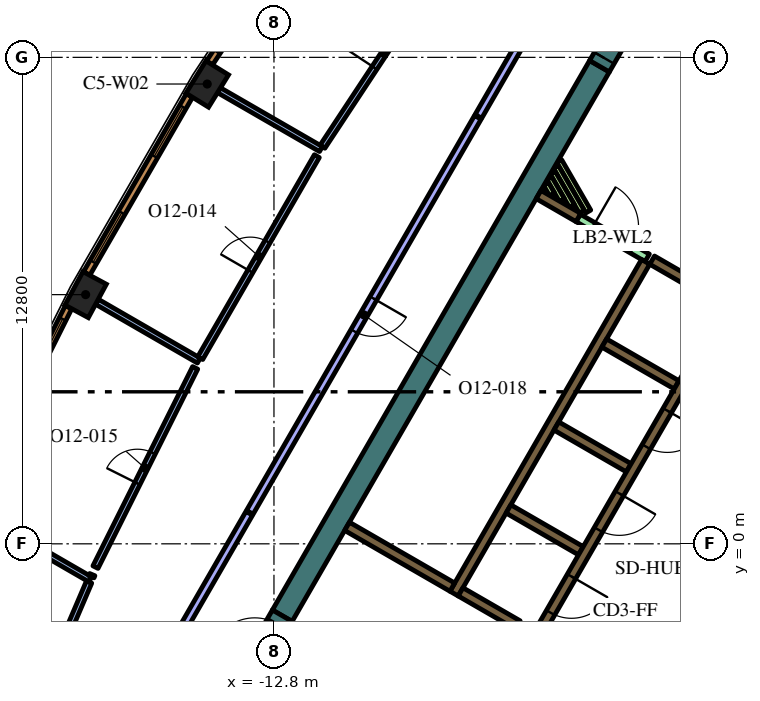
"""IFC4 building model, lengths in metres.
Left out: names, types, materials, properties, quantities, classifications, styles, units other than length and angle.
Written with IfcOpenShell. Run it as: python <this file> out.ifc"""

import sys

from ifc_helpers import new_model, si_unit, direction, frame, frame_2d, origin, origin_2d, place, context, subcontext, project, spatial, polyline, rectangle, outline, extrude, element, fill, save


model = new_model("IFC4")
c1 = context("Model", 3, precision=1e-05, world=origin(), true_north=direction((0.0, 1.0)))
c2 = subcontext(c1, "Body", "Model", "MODEL_VIEW")
j1 = project(units=[si_unit("LENGTHUNIT", "METRE"), si_unit("PLANEANGLEUNIT", "RADIAN")], contexts=[c1])
p1 = place(None, origin())
s1 = spatial("IfcSite", under=j1, at=p1, CompositionType="ELEMENT")
p2 = place(p1, origin())
s2 = spatial("IfcBuilding", under=s1, at=p2, CompositionType="ELEMENT")
p3 = place(p2, frame((0.0, 0.0, 279.6)))
s3 = spatial("IfcBuildingStorey", under=s2, at=p3, CompositionType="ELEMENT", Elevation=279.6)
for number, where, z_axis, x_axis in (
    (1, (-14.556, 12.098, 0.0), (0.0, 0.0, 1.0), (-0.526, -0.851, 0.0)),
    (2, (-17.756, 6.557, 0.0), (0.0, 0.0, 1.0), (-0.474, -0.881, 0.0)),
):
    element("IfcColumn", number, at=place(p3, frame(where, z_axis=z_axis, x_axis=x_axis)), inside=s3, PredefinedType="COLUMN", context=c2, shape_type="SweptSolid", body=[
        extrude(rectangle(XDim=1.0, YDim=0.7, at=origin_2d()), origin(), (0.0, 0.0, 1.0), 4.2),
    ])
p4 = place(p3, frame((-4.234, 12.566, 0.0), z_axis=(0.0, 0.0, 1.0), x_axis=(-0.499998841866, -0.866026072432, 0.0)))
e3 = element("IfcWall", 3, at=p4, inside=s3, PredefinedType="SOLIDWALL", context=c2, shape_type="SweptSolid", body=[
    extrude(rectangle(XDim=16.694, YDim=0.6, at=frame_2d((8.347, 0.0))), origin(), (0.0, 0.0, 1.0), 4.2),
])
p5 = place(p3, frame((-3.02, 7.419, 0.0), z_axis=(0.0, 0.0, 1.0), x_axis=(-0.500022956343, -0.866012149528, 0.0)))
e4 = element("IfcWall", 4, at=p5, inside=s3, PredefinedType="SOLIDWALL", context=c2, shape_type="SweptSolid", body=[
    extrude(rectangle(XDim=10.08, YDim=0.25, at=frame_2d((5.04, 0.0))), origin(), (0.0, 0.0, 1.0), 4.2),
])
p6 = place(p3, origin())
e5 = element("IfcWall", 5, at=p6, inside=s3, PredefinedType="SOLIDWALL", context=c2, shape_type="SweptSolid", body=[
    extrude(outline(polyline([(-2.912, 7.356), (-2.787, 7.573), (-1.232, 6.675), (-1.303, 6.675), (-1.304, 6.675), (-1.304, 6.675), (-1.304, 6.525), (-1.304, 6.525), (-1.303, 6.525), (-0.971, 6.525), (-0.665, 6.348), (-0.79, 6.132), (-1.007, 6.257), (-1.007, 6.257), (-2.912, 7.356)])), origin(), (0.0, 0.0, 1.0), 4.2),
])
for number, where, z_axis, x_axis in (
    (6, (-2.204, 4.182, 0.0), (0.0, 0.0, 1.0), (-0.866, 0.5, 0.0)),
    (7, (-5.369, 3.1, 0.0), (0.0, 0.0, 1.0), (0.866, -0.5, 0.0)),
    (8, (-4.724, -0.182, 0.0), (0.0, 0.0, 1.0), (-0.866, 0.5, 0.0)),
):
    element("IfcWall", number, at=place(p3, frame(where, z_axis=z_axis, x_axis=x_axis)), inside=s3, PredefinedType="SOLIDWALL", context=c2, shape_type="SweptSolid", body=[
        extrude(rectangle(XDim=2.2, YDim=0.25, at=frame_2d((1.1, 0.0))), origin(), (0.0, 0.0, 1.0), 4.2),
    ])
p7 = place(p3, frame((-7.889, -1.265, 0.0), z_axis=(0.0, 0.0, 1.0), x_axis=(0.865986741702, -0.500066958712, 0.0)))
e9 = element("IfcWall", 9, at=p7, inside=s3, PredefinedType="SOLIDWALL", context=c2, shape_type="SweptSolid", body=[
    extrude(rectangle(XDim=1.738, YDim=0.25, at=frame_2d((0.869, 0.0))), origin(), (0.0, 0.0, 1.0), 4.2),
])
p8 = place(p3, frame((-8.106, -1.14, 0.0), z_axis=(0.0, 0.0, 1.0), x_axis=(-0.866008981251, 0.500028443584, 0.0)))
e10 = element("IfcWall", 10, at=p8, inside=s3, PredefinedType="SOLIDWALL", context=c2, shape_type="SweptSolid", body=[
    extrude(rectangle(XDim=3.2, YDim=0.25, at=frame_2d((1.6, 0.0))), origin(), (0.0, 0.0, 1.0), 4.2),
])
p9 = place(p3, frame((-5.837, 9.19, 0.0), z_axis=(0.0, 0.0, 1.0), x_axis=(0.866024298998, -0.500001913541, 0.0)))
e11 = element("IfcWall", 11, at=p9, inside=s3, PredefinedType="SOLIDWALL", context=c2, shape_type="SweptSolid", body=[
    extrude(rectangle(XDim=1.21, YDim=0.25, at=frame_2d((0.605, 0.0))), origin(), (0.0, 0.0, 1.0), 4.2),
])
p10 = place(p3, frame((-5.294, 10.067, 0.0), z_axis=(0.0, 0.0, 1.0), x_axis=(0.500054140411, -0.865994143547, 0.0)))
e12 = element("IfcWall", 12, at=p10, inside=s3, PredefinedType="PARTITIONING", context=c2, shape_type="SweptSolid", body=[
    extrude(rectangle(XDim=1.529, YDim=0.15, at=frame_2d((0.765, 0.0))), origin(), (0.0, 0.0, 1.0), 3.55),
])
p11 = place(p3, frame((-5.381, 9.917, 0.0), z_axis=(0.0, 0.0, 1.0), x_axis=(0.500136970483, -0.865946309396, 0.0)))
e13 = element("IfcWall", 13, at=p11, inside=s3, PredefinedType="PARTITIONING", context=c2, shape_type="SweptSolid", body=[
    extrude(rectangle(XDim=1.359, YDim=0.15, at=frame_2d((0.68, 0.0))), origin(), (0.0, 0.0, 1.0), 3.55),
])
p12 = place(p3, frame((-5.467, 9.767, 0.0), z_axis=(0.0, 0.0, 1.0), x_axis=(0.500168849293, -0.86592789665, 0.0)))
e14 = element("IfcWall", 14, at=p12, inside=s3, PredefinedType="PARTITIONING", context=c2, shape_type="SweptSolid", body=[
    extrude(rectangle(XDim=1.01, YDim=0.15, at=frame_2d((0.505, 0.0))), origin(), (0.0, 0.0, 1.0), 3.55),
])
p13 = place(p3, frame((-5.554, 9.617, 0.0), z_axis=(0.0, 0.0, 1.0), x_axis=(0.500253084543, -0.86587923604, 0.0)))
e15 = element("IfcWall", 15, at=p13, inside=s3, PredefinedType="PARTITIONING", context=c2, shape_type="SweptSolid", body=[
    extrude(rectangle(XDim=0.664, YDim=0.15, at=frame_2d((0.332, 0.0))), origin(), (0.0, 0.0, 1.0), 3.55),
])
p14 = place(p3, frame((-5.64, 9.467, 0.0), z_axis=(0.0, 0.0, 1.0), x_axis=(0.499944387978, -0.86605750902, 0.0)))
e16 = element("IfcWall", 16, at=p14, inside=s3, PredefinedType="PARTITIONING", context=c2, shape_type="SweptSolid", body=[
    extrude(rectangle(XDim=0.317, YDim=0.15, at=frame_2d((0.159, 0.0))), origin(), (0.0, 0.0, 1.0), 3.55),
])
p15 = place(p3, frame((-0.898, 6.194, 0.0), z_axis=(0.0, 0.0, 1.0), x_axis=(-0.499996202215, -0.866027596426, 0.0)))
e17 = element("IfcWall", 17, at=p15, inside=s3, PredefinedType="SOLIDWALL", context=c2, shape_type="SweptSolid", body=[
    extrude(rectangle(XDim=9.83, YDim=0.25, at=frame_2d((4.915, 0.0))), origin(), (0.0, 0.0, 1.0), 4.2),
])
p16 = place(p15, frame((0.585, 0.0, 0.0)))
e18 = element("IfcOpeningElement", 18, at=p16, cuts=e17, PredefinedType="OPENING", context=c2, shape_type="SweptSolid", body=[
    extrude(rectangle(XDim=1.1, YDim=2.1, at=frame_2d((0.55, 1.05))), frame((0.0, 0.135, 0.0), z_axis=(0.0, -1.0, 0.0), x_axis=(1.0, 0.0, 0.0)), (0.0, 0.0, 1.0), 0.27),
])
p17 = place(p15, frame((3.105, 0.0, 0.0)))
e19 = element("IfcOpeningElement", 19, at=p17, cuts=e17, PredefinedType="OPENING", context=c2, shape_type="SweptSolid", body=[
    extrude(rectangle(XDim=1.1, YDim=2.1, at=frame_2d((0.55, 1.05))), frame((0.0, 0.135, 0.0), z_axis=(0.0, -1.0, 0.0), x_axis=(1.0, 0.0, 0.0)), (0.0, 0.0, 1.0), 0.27),
])
p18 = place(p15, frame((5.625, 0.0, 0.0)))
e20 = element("IfcOpeningElement", 20, at=p18, cuts=e17, PredefinedType="OPENING", context=c2, shape_type="SweptSolid", body=[
    extrude(rectangle(XDim=1.1, YDim=2.1, at=frame_2d((0.55, 1.05))), frame((0.0, 0.135, 0.0), z_axis=(0.0, -1.0, 0.0), x_axis=(1.0, 0.0, 0.0)), (0.0, 0.0, 1.0), 0.27),
])
p19 = place(p15, frame((8.145, 0.0, 0.0)))
e21 = element("IfcOpeningElement", 21, at=p19, cuts=e17, PredefinedType="OPENING", context=c2, shape_type="SweptSolid", body=[
    extrude(rectangle(XDim=1.1, YDim=2.1, at=frame_2d((0.55, 1.05))), frame((0.0, 0.135, 0.0), z_axis=(0.0, -1.0, 0.0), x_axis=(1.0, 0.0, 0.0)), (0.0, 0.0, 1.0), 0.27),
])
p20 = place(p3, frame((-4.796, 8.575, 0.0), z_axis=(0.0, 0.0, 1.0), x_axis=(0.866009402589, -0.500027713859, 0.0)))
e22 = element("IfcWall", 22, at=p20, inside=s3, PredefinedType="PARTITIONING", context=c2, shape_type="SweptSolid", body=[
    extrude(rectangle(XDim=2.1, YDim=0.226, at=frame_2d((1.05, 0.0))), origin(), (0.0, 0.0, 1.0), 3.55),
])
p21 = place(p20, frame((0.45, 0.0, 0.0)))
e23 = element("IfcOpeningElement", 23, at=p21, cuts=e22, PredefinedType="OPENING", context=c2, shape_type="SweptSolid", body=[
    extrude(rectangle(XDim=1.2, YDim=2.1, at=frame_2d((0.6, 1.05))), frame((0.0, 0.123, 0.0), z_axis=(0.0, -1.0, 0.0), x_axis=(1.0, 0.0, 0.0)), (0.0, 0.0, 1.0), 0.246),
])
p22 = place(p3, frame((-4.234, 12.566, 0.0), z_axis=(0.0, 0.0, 1.0), x_axis=(0.500000056704, 0.866025371046, 0.0)))
e24 = element("IfcWall", 24, at=p22, inside=s3, PredefinedType="SOLIDWALL", context=c2, shape_type="SweptSolid", body=[
    extrude(rectangle(XDim=1.7, YDim=0.6, at=frame_2d((0.85, 0.0))), origin(), (0.0, 0.0, 1.0), 4.2),
])
p23 = place(p22, frame((0.25, 0.0, 0.0)))
e25 = element("IfcOpeningElement", 25, at=p23, cuts=e24, PredefinedType="OPENING", context=c2, shape_type="SweptSolid", body=[
    extrude(rectangle(XDim=1.2, YDim=2.1, at=frame_2d((0.6, 1.05))), frame((0.0, 0.31, 0.0), z_axis=(0.0, -1.0, 0.0), x_axis=(1.0, 0.0, 0.0)), (0.0, 0.0, 1.0), 0.62),
])
p24 = place(p3, frame((-13.432, -3.364, 0.0), z_axis=(0.0, 0.0, 1.0), x_axis=(0.500000056704, 0.866025371046, 0.0)))
e26 = element("IfcWall", 26, at=p24, inside=s3, PredefinedType="SOLIDWALL", context=c2, shape_type="SweptSolid", body=[
    extrude(rectangle(XDim=1.7, YDim=0.6, at=frame_2d((0.85, 0.0))), origin(), (0.0, 0.0, 1.0), 4.2),
])
p25 = place(p24, frame((0.25, 0.0, 0.0)))
e27 = element("IfcOpeningElement", 27, at=p25, cuts=e26, PredefinedType="OPENING", context=c2, shape_type="SweptSolid", body=[
    extrude(rectangle(XDim=1.2, YDim=2.1, at=frame_2d((0.6, 1.05))), frame((0.0, 0.31, 0.0), z_axis=(0.0, -1.0, 0.0), x_axis=(1.0, 0.0, 0.0)), (0.0, 0.0, 1.0), 0.62),
])
p26 = place(p3, frame((-11.564, 10.387, 0.0), z_axis=(0.0, 0.0, 1.0), x_axis=(-0.86604641216, 0.499963610661, 0.0)))
e28 = element("IfcWall", 28, at=p26, inside=s3, PredefinedType="PARTITIONING", context=c2, shape_type="SweptSolid", body=[
    extrude(rectangle(XDim=3.096, YDim=0.15, at=frame_2d((1.548, 0.0))), origin(), (0.0, 0.0, 1.0), 3.55),
])
p27 = place(p3, frame((-11.523, 10.449, 0.0), z_axis=(0.0, 0.0, 1.0), x_axis=(0.550751709023, 0.834669129061, 0.0)))
e29 = element("IfcWall", 29, at=p27, inside=s3, PredefinedType="PARTITIONING", context=c2, shape_type="SweptSolid", body=[
    extrude(rectangle(XDim=5.788, YDim=0.15, at=frame_2d((2.894, 0.0))), origin(), (0.0, 0.0, 1.0), 3.55),
])
p28 = place(p27, frame((2.488, 0.0, 0.0)))
e30 = element("IfcOpeningElement", 30, at=p28, cuts=e29, PredefinedType="OPENING", context=c2, shape_type="SweptSolid", body=[
    extrude(rectangle(XDim=0.9, YDim=2.1, at=frame_2d((0.45, 1.05))), frame((0.0, 0.085, 0.0), z_axis=(0.0, -1.0, 0.0), x_axis=(1.0, 0.0, 0.0)), (0.0, 0.0, 1.0), 0.17),
])
p29 = place(p3, frame((-14.777, 4.822, 0.0), z_axis=(0.0, 0.0, 1.0), x_axis=(-0.865992557167, 0.500056887695, 0.0)))
e31 = element("IfcWall", 31, at=p29, inside=s3, PredefinedType="PARTITIONING", context=c2, shape_type="SweptSolid", body=[
    extrude(rectangle(XDim=3.096, YDim=0.15, at=frame_2d((1.548, 0.0))), origin(), (0.0, 0.0, 1.0), 3.55),
])
p30 = place(p3, frame((-14.74, 4.887, 0.0), z_axis=(0.0, 0.0, 1.0), x_axis=(0.500007141444, 0.86602128063, 0.0)))
e32 = element("IfcWall", 32, at=p30, inside=s3, PredefinedType="PARTITIONING", context=c2, shape_type="SweptSolid", body=[
    extrude(rectangle(XDim=6.137, YDim=0.15, at=frame_2d((3.068, 0.0))), origin(), (0.0, 0.0, 1.0), 3.55),
])
p31 = place(p30, frame((2.637, 0.0, 0.0)))
e33 = element("IfcOpeningElement", 33, at=p31, cuts=e32, PredefinedType="OPENING", context=c2, shape_type="SweptSolid", body=[
    extrude(rectangle(XDim=0.9, YDim=2.1, at=frame_2d((0.45, 1.05))), frame((0.0, 0.085, 0.0), z_axis=(0.0, -1.0, 0.0), x_axis=(1.0, 0.0, 0.0)), (0.0, 0.0, 1.0), 0.17),
])
p32 = place(p3, frame((-17.635, -0.936, 0.0), z_axis=(0.0, 0.0, 1.0), x_axis=(-0.866044607523, 0.499966736674, 0.0)))
e34 = element("IfcWall", 34, at=p32, inside=s3, PredefinedType="PARTITIONING", context=c2, shape_type="SweptSolid", body=[
    extrude(rectangle(XDim=3.115, YDim=0.15, at=frame_2d((1.557, 0.0))), origin(), (0.0, 0.0, 1.0), 3.55),
])
p33 = place(p3, frame((-17.497, -0.613, 0.0), z_axis=(0.0, 0.0, 1.0), x_axis=(0.447480081559, 0.89429389834, 0.0)))
e35 = element("IfcWall", 35, at=p33, inside=s3, PredefinedType="PARTITIONING", context=c2, shape_type="SweptSolid", body=[
    extrude(rectangle(XDim=5.863, YDim=0.15, at=frame_2d((2.931, 0.0))), origin(), (0.0, 0.0, 1.0), 3.55),
])
p34 = place(p33, frame((2.463, 0.0, 0.0)))
e36 = element("IfcOpeningElement", 36, at=p34, cuts=e35, PredefinedType="OPENING", context=c2, shape_type="SweptSolid", body=[
    extrude(rectangle(XDim=0.9, YDim=2.1, at=frame_2d((0.45, 1.05))), frame((0.0, 0.085, 0.0), z_axis=(0.0, -1.0, 0.0), x_axis=(1.0, 0.0, 0.0)), (0.0, 0.0, 1.0), 0.17),
])
p35 = place(p3, frame((-17.581, -0.81, 0.0), z_axis=(0.0, 0.0, 1.0), x_axis=(-0.390033474923, -0.92080067791, 0.0)))
e37 = element("IfcWall", 37, at=p35, inside=s3, PredefinedType="PARTITIONING", context=c2, shape_type="SweptSolid", body=[
    extrude(rectangle(XDim=0.061, YDim=0.15, at=frame_2d((0.03, 0.0))), origin(), (0.0, 0.0, 1.0), 3.55),
])
p36 = place(p3, frame((-19.608, -5.549, 0.0), z_axis=(0.0, 0.0, 1.0), x_axis=(0.393352855097, 0.919387584964, 0.0)))
e38 = element("IfcWall", 38, at=p36, inside=s3, PredefinedType="PARTITIONING", context=c2, shape_type="SweptSolid", body=[
    extrude(rectangle(XDim=4.942, YDim=0.15, at=frame_2d((2.471, 0.0))), origin(), (0.0, 0.0, 1.0), 3.55),
])
p37 = place(p36, frame((2.042, 0.0, 0.0)))
e39 = element("IfcOpeningElement", 39, at=p37, cuts=e38, PredefinedType="OPENING", context=c2, shape_type="SweptSolid", body=[
    extrude(rectangle(XDim=0.9, YDim=2.1, at=frame_2d((0.45, 1.05))), frame((0.0, 0.085, 0.0), z_axis=(0.0, -1.0, 0.0), x_axis=(1.0, 0.0, 0.0)), (0.0, 0.0, 1.0), 0.17),
])
p38 = place(p3, frame((-7.436, 11.221, 0.0), z_axis=(0.0, 0.0, 1.0), x_axis=(-0.49999894854, -0.866026010844, 0.0)))
e40 = element("IfcWall", 40, at=p38, inside=s3, PredefinedType="PARTITIONING", context=c2, shape_type="SweptSolid", body=[
    extrude(rectangle(XDim=12.0, YDim=0.2, at=frame_2d((6.0, 0.0))), origin(), (0.0, 0.0, 1.0), 3.55),
])
p39 = place(p38, frame((5.5, 0.0, 0.0)))
e41 = element("IfcOpeningElement", 41, at=p39, cuts=e40, PredefinedType="OPENING", context=c2, shape_type="SweptSolid", body=[
    extrude(rectangle(XDim=1.0, YDim=2.1, at=frame_2d((0.5, 1.05))), frame((0.0, 0.11, 0.0), z_axis=(0.0, -1.0, 0.0), x_axis=(1.0, 0.0, 0.0)), (0.0, 0.0, 1.0), 0.22),
])
p40 = place(p3, frame((-13.451, 0.803, 0.0), z_axis=(0.0, 0.0, 1.0), x_axis=(-0.499982585408, -0.86603545787, 0.0)))
e42 = element("IfcWall", 42, at=p40, inside=s3, PredefinedType="PARTITIONING", context=c2, shape_type="SweptSolid", body=[
    extrude(rectangle(XDim=8.26, YDim=0.2, at=frame_2d((4.13, 0.0))), origin(), (0.0, 0.0, 1.0), 3.55),
])
p41 = place(p3, frame((-3.306, 18.374, 0.0), z_axis=(0.0, 0.0, 1.0), x_axis=(-0.499999798456, -0.866025520146, 0.0)))
e43 = element("IfcWall", 43, at=p41, inside=s3, PredefinedType="PARTITIONING", context=c2, shape_type="SweptSolid", body=[
    extrude(rectangle(XDim=8.229, YDim=0.2, at=frame_2d((4.115, 0.0))), origin(), (0.0, 0.0, 1.0), 3.55),
])
p42 = place(p3, frame((-11.518, 17.166, 0.0), z_axis=(0.0, 0.0, 1.0), x_axis=(-0.550744054781, -0.83467417962, 0.0)))
e44 = element("IfcWall", 44, at=p42, inside=s3, PredefinedType="SOLIDWALL", context=c2, shape_type="SweptSolid", body=[
    extrude(rectangle(XDim=5.406, YDim=0.19, at=frame_2d((2.703, 0.0))), origin(), (0.0, 0.0, 1.0), 3.95),
])
p43 = place(p42, frame((0.346, 0.0, 0.6)))
e45 = element("IfcOpeningElement", 45, at=p43, cuts=e44, PredefinedType="OPENING", context=c2, shape_type="SweptSolid", body=[
    extrude(rectangle(XDim=1.5, YDim=2.85, at=frame_2d((0.75, 1.425))), frame((0.0, 0.105, 0.0), z_axis=(0.0, -1.0, 0.0), x_axis=(1.0, 0.0, 0.0)), (0.0, 0.0, 1.0), 0.21),
])
p44 = place(p42, frame((3.559, 0.0, 0.6)))
e46 = element("IfcOpeningElement", 46, at=p44, cuts=e44, PredefinedType="OPENING", context=c2, shape_type="SweptSolid", body=[
    extrude(rectangle(XDim=1.5, YDim=2.85, at=frame_2d((0.75, 1.425))), frame((0.0, 0.105, 0.0), z_axis=(0.0, -1.0, 0.0), x_axis=(1.0, 0.0, 0.0)), (0.0, 0.0, 1.0), 0.21),
])
p45 = place(p3, frame((-15.025, 11.796, 0.0), z_axis=(0.0, 0.0, 1.0), x_axis=(-0.500024767483, -0.866011103799, 0.0)))
e47 = element("IfcWall", 47, at=p45, inside=s3, PredefinedType="SOLIDWALL", context=c2, shape_type="SweptSolid", body=[
    extrude(rectangle(XDim=5.406, YDim=0.19, at=frame_2d((2.703, 0.0))), origin(), (0.0, 0.0, 1.0), 3.95),
])
p46 = place(p45, frame((0.346, 0.0, 0.6)))
e48 = element("IfcOpeningElement", 48, at=p46, cuts=e47, PredefinedType="OPENING", context=c2, shape_type="SweptSolid", body=[
    extrude(rectangle(XDim=1.5, YDim=2.85, at=frame_2d((0.75, 1.425))), frame((0.0, 0.105, 0.0), z_axis=(0.0, -1.0, 0.0), x_axis=(1.0, 0.0, 0.0)), (0.0, 0.0, 1.0), 0.21),
])
p47 = place(p45, frame((3.559, 0.0, 0.6)))
e49 = element("IfcOpeningElement", 49, at=p47, cuts=e47, PredefinedType="OPENING", context=c2, shape_type="SweptSolid", body=[
    extrude(rectangle(XDim=1.5, YDim=2.85, at=frame_2d((0.75, 1.425))), frame((0.0, 0.105, 0.0), z_axis=(0.0, -1.0, 0.0), x_axis=(1.0, 0.0, 0.0)), (0.0, 0.0, 1.0), 0.21),
])
p48 = place(p3, frame((-18.206, 6.227, 0.0), z_axis=(0.0, 0.0, 1.0), x_axis=(-0.447484531401, -0.894291671747, 0.0)))
e50 = element("IfcWall", 50, at=p48, inside=s3, PredefinedType="SOLIDWALL", context=c2, shape_type="SweptSolid", body=[
    extrude(rectangle(XDim=5.406, YDim=0.19, at=frame_2d((2.703, 0.0))), origin(), (0.0, 0.0, 1.0), 3.95),
])
p49 = place(p48, frame((0.346, 0.0, 0.6)))
e51 = element("IfcOpeningElement", 51, at=p49, cuts=e50, PredefinedType="OPENING", context=c2, shape_type="SweptSolid", body=[
    extrude(rectangle(XDim=1.5, YDim=2.85, at=frame_2d((0.75, 1.425))), frame((0.0, 0.105, 0.0), z_axis=(0.0, -1.0, 0.0), x_axis=(1.0, 0.0, 0.0)), (0.0, 0.0, 1.0), 0.21),
])
p50 = place(p48, frame((3.559, 0.0, 0.6)))
e52 = element("IfcOpeningElement", 52, at=p50, cuts=e50, PredefinedType="OPENING", context=c2, shape_type="SweptSolid", body=[
    extrude(rectangle(XDim=1.5, YDim=2.85, at=frame_2d((0.75, 1.425))), frame((0.0, 0.105, 0.0), z_axis=(0.0, -1.0, 0.0), x_axis=(1.0, 0.0, 0.0)), (0.0, 0.0, 1.0), 0.21),
])
p51 = place(p17, origin())
e53 = element("IfcDoor", 53, at=p51, inside=s3, OperationType="DOUBLE_DOOR_SLIDING", PredefinedType="DOOR", context=c2, shape_type="SweptSolid", body=[
    extrude(rectangle(XDim=1.1, YDim=2.1, at=frame_2d((0.55, 1.05))), frame((0.0, 0.025, 0.0), z_axis=(0.0, -1.0, 0.0), x_axis=(1.0, 0.0, 0.0)), (0.0, 0.0, 1.0), 0.05),
])
fill(e19, e53)
p52 = place(p18, origin())
e54 = element("IfcDoor", 54, at=p52, inside=s3, OperationType="DOUBLE_DOOR_SLIDING", PredefinedType="DOOR", context=c2, shape_type="SweptSolid", body=[
    extrude(rectangle(XDim=1.1, YDim=2.1, at=frame_2d((0.55, 1.05))), frame((0.0, 0.025, 0.0), z_axis=(0.0, -1.0, 0.0), x_axis=(1.0, 0.0, 0.0)), (0.0, 0.0, 1.0), 0.05),
])
fill(e20, e54)
p53 = place(p19, origin())
e55 = element("IfcDoor", 55, at=p53, inside=s3, OperationType="DOUBLE_DOOR_SLIDING", PredefinedType="DOOR", context=c2, shape_type="SweptSolid", body=[
    extrude(rectangle(XDim=1.1, YDim=2.1, at=frame_2d((0.55, 1.05))), frame((0.0, 0.025, 0.0), z_axis=(0.0, -1.0, 0.0), x_axis=(1.0, 0.0, 0.0)), (0.0, 0.0, 1.0), 0.05),
])
fill(e21, e55)
p54 = place(p21, origin())
e56 = element("IfcDoor", 56, at=p54, inside=s3, OperationType="SINGLE_SWING_LEFT", PredefinedType="DOOR", context=c2, shape_type="SweptSolid", body=[
    extrude(rectangle(XDim=1.2, YDim=2.1, at=frame_2d((0.6, 1.05))), frame((0.0, 0.025, 0.0), z_axis=(0.0, -1.0, 0.0), x_axis=(1.0, 0.0, 0.0)), (0.0, 0.0, 1.0), 0.05),
])
fill(e23, e56)
p55 = place(p23, origin())
e57 = element("IfcDoor", 57, at=p55, inside=s3, OperationType="SINGLE_SWING_LEFT", PredefinedType="DOOR", context=c2, shape_type="SweptSolid", body=[
    extrude(rectangle(XDim=1.2, YDim=2.1, at=frame_2d((0.6, 1.05))), frame((0.0, 0.025, 0.0), z_axis=(0.0, -1.0, 0.0), x_axis=(1.0, 0.0, 0.0)), (0.0, 0.0, 1.0), 0.05),
])
fill(e25, e57)
p56 = place(p28, origin())
e58 = element("IfcDoor", 58, at=p56, inside=s3, OperationType="SINGLE_SWING_RIGHT", PredefinedType="DOOR", context=c2, shape_type="SweptSolid", body=[
    extrude(rectangle(XDim=0.9, YDim=2.1, at=frame_2d((0.45, 1.05))), frame((0.0, 0.025, 0.0), z_axis=(0.0, -1.0, 0.0), x_axis=(1.0, 0.0, 0.0)), (0.0, 0.0, 1.0), 0.05),
])
fill(e30, e58)
p57 = place(p31, origin())
e59 = element("IfcDoor", 59, at=p57, inside=s3, OperationType="SINGLE_SWING_RIGHT", PredefinedType="DOOR", context=c2, shape_type="SweptSolid", body=[
    extrude(rectangle(XDim=0.9, YDim=2.1, at=frame_2d((0.45, 1.05))), frame((0.0, 0.025, 0.0), z_axis=(0.0, -1.0, 0.0), x_axis=(1.0, 0.0, 0.0)), (0.0, 0.0, 1.0), 0.05),
])
fill(e33, e59)
p58 = place(p34, origin())
e60 = element("IfcDoor", 60, at=p58, inside=s3, OperationType="SINGLE_SWING_LEFT", PredefinedType="DOOR", context=c2, shape_type="SweptSolid", body=[
    extrude(rectangle(XDim=0.9, YDim=2.1, at=frame_2d((0.45, 1.05))), frame((0.0, 0.025, 0.0), z_axis=(0.0, -1.0, 0.0), x_axis=(1.0, 0.0, 0.0)), (0.0, 0.0, 1.0), 0.05),
])
fill(e36, e60)
p59 = place(p39, origin())
e61 = element("IfcDoor", 61, at=p59, inside=s3, OperationType="SINGLE_SWING_RIGHT", PredefinedType="DOOR", context=c2, shape_type="SweptSolid", body=[
    extrude(rectangle(XDim=1.0, YDim=2.1, at=frame_2d((0.5, 1.05))), frame((0.0, 0.025, 0.0), z_axis=(0.0, -1.0, 0.0), x_axis=(1.0, 0.0, 0.0)), (0.0, 0.0, 1.0), 0.05),
])
fill(e41, e61)
p60 = place(p44, origin())
e62 = element("IfcWindow", 62, at=p60, inside=s3, PartitioningType="SINGLE_PANEL", PredefinedType="WINDOW", context=c2, shape_type="SweptSolid", body=[
    extrude(rectangle(XDim=1.5, YDim=2.85, at=frame_2d((0.75, 1.425))), frame((0.0, 0.045, 0.0), z_axis=(0.0, -1.0, 0.0), x_axis=(1.0, 0.0, 0.0)), (0.0, 0.0, 1.0), 0.06),
])
fill(e46, e62)
p61 = place(p46, origin())
e63 = element("IfcWindow", 63, at=p61, inside=s3, PartitioningType="SINGLE_PANEL", PredefinedType="WINDOW", context=c2, shape_type="SweptSolid", body=[
    extrude(rectangle(XDim=1.5, YDim=2.85, at=frame_2d((0.75, 1.425))), frame((0.0, 0.045, 0.0), z_axis=(0.0, -1.0, 0.0), x_axis=(1.0, 0.0, 0.0)), (0.0, 0.0, 1.0), 0.06),
])
fill(e48, e63)
p62 = place(p47, origin())
e64 = element("IfcWindow", 64, at=p62, inside=s3, PartitioningType="SINGLE_PANEL", PredefinedType="WINDOW", context=c2, shape_type="SweptSolid", body=[
    extrude(rectangle(XDim=1.5, YDim=2.85, at=frame_2d((0.75, 1.425))), frame((0.0, 0.045, 0.0), z_axis=(0.0, -1.0, 0.0), x_axis=(1.0, 0.0, 0.0)), (0.0, 0.0, 1.0), 0.06),
])
fill(e49, e64)
p63 = place(p49, origin())
e65 = element("IfcWindow", 65, at=p63, inside=s3, PartitioningType="SINGLE_PANEL", PredefinedType="WINDOW", context=c2, shape_type="SweptSolid", body=[
    extrude(rectangle(XDim=1.5, YDim=2.85, at=frame_2d((0.75, 1.425))), frame((0.0, 0.045, 0.0), z_axis=(0.0, -1.0, 0.0), x_axis=(1.0, 0.0, 0.0)), (0.0, 0.0, 1.0), 0.06),
])
fill(e51, e65)
save(model, sys.argv[1])
